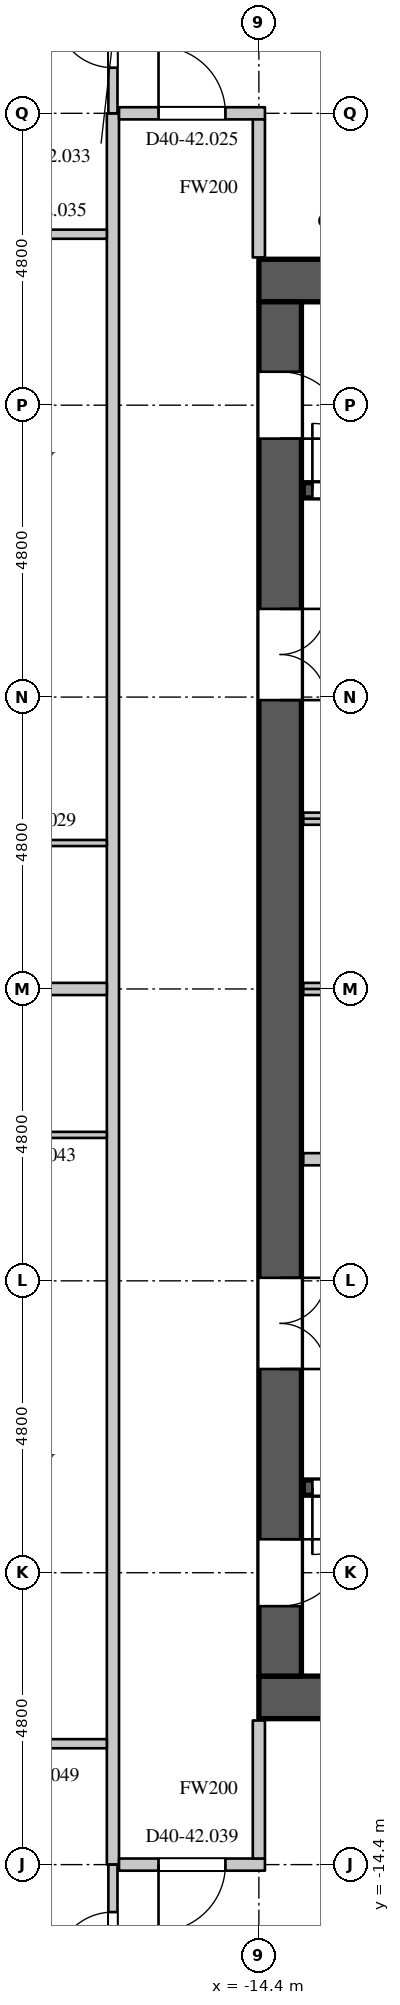
"""IFC4 building model, lengths in metres.
Left out: names, types, materials, properties, quantities, classifications, styles, units other than length and angle.
Written with IfcOpenShell. Run it as: python <this file> out.ifc"""

import sys

from ifc_helpers import new_model, si_unit, direction, frame, frame_2d, origin, place, context, subcontext, project, spatial, rectangle, extrude, element, fill, save


model = new_model("IFC4")
c1 = context("Model", 3, precision=1e-05, world=origin(), true_north=direction((0.0, 1.0)))
c2 = subcontext(c1, "Body", "Model", "MODEL_VIEW")
j1 = project(units=[si_unit("LENGTHUNIT", "METRE"), si_unit("PLANEANGLEUNIT", "RADIAN")], contexts=[c1])
p1 = place(None, origin())
s1 = spatial("IfcSite", under=j1, at=p1, CompositionType="ELEMENT")
p2 = place(p1, origin())
s2 = spatial("IfcBuilding", under=s1, at=p2, CompositionType="ELEMENT")
p3 = place(p2, frame((0.0, 0.0, 174.9)))
s3 = spatial("IfcBuildingStorey", under=s2, at=p3, CompositionType="ELEMENT", Elevation=174.9)
for number, where, z_axis, x_axis in (
    (1, (-14.4, 11.65, 0.0), (0.0, 0.0, 1.0), (1.0, 0.0, 0.0)),
    (2, (-14.4, -11.65, 0.0), (0.0, 0.0, 1.0), (1.0, 0.0, 0.0)),
):
    element("IfcWall", number, at=place(p3, frame(where, z_axis=z_axis, x_axis=x_axis)), inside=s3, PredefinedType="SHEAR", context=c2, shape_type="SweptSolid", body=[
        extrude(rectangle(XDim=28.8, YDim=0.7, at=frame_2d((14.4, 0.0))), origin(), (0.0, 0.0, 1.0), 4.2),
    ])
p4 = place(p3, frame((-14.05, -11.3, 0.0), z_axis=(0.0, 0.0, 1.0), x_axis=(0.0, 1.0, 0.0)))
e3 = element("IfcWall", 3, at=p4, inside=s3, PredefinedType="SHEAR", context=c2, shape_type="SweptSolid", body=[
    extrude(rectangle(XDim=22.6, YDim=0.7, at=frame_2d((11.3, 0.0))), origin(), (0.0, 0.0, 1.0), 4.2),
])
p5 = place(p4, frame((20.35, 0.0, 0.0)))
e4 = element("IfcOpeningElement", 4, at=p5, cuts=e3, PredefinedType="OPENING", context=c2, shape_type="SweptSolid", body=[
    extrude(rectangle(XDim=1.1, YDim=2.2, at=frame_2d((0.55, 1.1))), frame((0.0, 0.36, 0.0), z_axis=(0.0, -1.0, 0.0), x_axis=(1.0, 0.0, 0.0)), (0.0, 0.0, 1.0), 0.72),
])
p6 = place(p4, frame((1.15, 0.0, 0.0)))
e5 = element("IfcOpeningElement", 5, at=p6, cuts=e3, PredefinedType="OPENING", context=c2, shape_type="SweptSolid", body=[
    extrude(rectangle(XDim=1.1, YDim=2.2, at=frame_2d((0.55, 1.1))), frame((0.0, 0.36, 0.0), z_axis=(0.0, -1.0, 0.0), x_axis=(1.0, 0.0, 0.0)), (0.0, 0.0, 1.0), 0.72),
])
p7 = place(p4, frame((16.05, 0.0, 0.0)))
e6 = element("IfcOpeningElement", 6, at=p7, cuts=e3, PredefinedType="OPENING", context=c2, shape_type="SweptSolid", body=[
    extrude(rectangle(XDim=1.5, YDim=2.4, at=frame_2d((0.75, 1.2))), frame((0.0, 0.36, 0.0), z_axis=(0.0, -1.0, 0.0), x_axis=(1.0, 0.0, 0.0)), (0.0, 0.0, 1.0), 0.72),
])
p8 = place(p4, frame((5.05, 0.0, 0.0)))
e7 = element("IfcOpeningElement", 7, at=p8, cuts=e3, PredefinedType="OPENING", context=c2, shape_type="SweptSolid", body=[
    extrude(rectangle(XDim=1.5, YDim=2.4, at=frame_2d((0.75, 1.2))), frame((0.0, 0.36, 0.0), z_axis=(0.0, -1.0, 0.0), x_axis=(1.0, 0.0, 0.0)), (0.0, 0.0, 1.0), 0.72),
])
p9 = place(p3, frame((-16.8, -14.4, 0.0), z_axis=(0.0, 0.0, 1.0), x_axis=(0.0, 1.0, 0.0)))
e8 = element("IfcWall", 8, at=p9, inside=s3, PredefinedType="PARTITIONING", context=c2, shape_type="SweptSolid", body=[
    extrude(rectangle(XDim=28.8, YDim=0.2, at=frame_2d((14.4, 0.0))), origin(), (0.0, 0.0, 1.0), 3.95),
])
p10 = place(p3, frame((-16.7, -14.4, 0.0), z_axis=(0.0, 0.0, 1.0), x_axis=(1.0, 0.0, 0.0)))
e9 = element("IfcWall", 9, at=p10, inside=s3, PredefinedType="PARTITIONING", context=c2, shape_type="SweptSolid", body=[
    extrude(rectangle(XDim=2.4, YDim=0.2, at=frame_2d((1.2, 0.0))), origin(), (0.0, 0.0, 1.0), 3.95),
])
p11 = place(p10, frame((0.65, 0.0, 0.0)))
e10 = element("IfcOpeningElement", 10, at=p11, cuts=e9, PredefinedType="OPENING", context=c2, shape_type="SweptSolid", body=[
    extrude(rectangle(XDim=1.1, YDim=2.4, at=frame_2d((0.55, 1.2))), frame((0.0, 0.11, 0.0), z_axis=(0.0, -1.0, 0.0), x_axis=(1.0, 0.0, 0.0)), (0.0, 0.0, 1.0), 0.22),
])
p12 = place(p3, frame((-16.7, 14.4, 0.0), z_axis=(0.0, 0.0, 1.0), x_axis=(1.0, 0.0, 0.0)))
e11 = element("IfcWall", 11, at=p12, inside=s3, PredefinedType="PARTITIONING", context=c2, shape_type="SweptSolid", body=[
    extrude(rectangle(XDim=2.4, YDim=0.2, at=frame_2d((1.2, 0.0))), origin(), (0.0, 0.0, 1.0), 3.95),
])
p13 = place(p12, frame((0.65, 0.0, 0.0)))
e12 = element("IfcOpeningElement", 12, at=p13, cuts=e11, PredefinedType="OPENING", context=c2, shape_type="SweptSolid", body=[
    extrude(rectangle(XDim=1.1, YDim=2.4, at=frame_2d((0.55, 1.2))), frame((0.0, 0.11, 0.0), z_axis=(0.0, -1.0, 0.0), x_axis=(1.0, 0.0, 0.0)), (0.0, 0.0, 1.0), 0.22),
])
for number, where, z_axis, x_axis in (
    (13, (-14.4, -14.3, 0.0), (0.0, 0.0, 1.0), (0.0, 1.0, 0.0)),
    (14, (-14.4, 12.03, 0.0), (0.0, 0.0, 1.0), (0.0, 1.0, 0.0)),
):
    element("IfcWall", number, at=place(p3, frame(where, z_axis=z_axis, x_axis=x_axis)), inside=s3, PredefinedType="PARTITIONING", context=c2, shape_type="SweptSolid", body=[
        extrude(rectangle(XDim=2.27, YDim=0.2, at=frame_2d((1.135, 0.0))), origin(), (0.0, 0.0, 1.0), 3.95),
    ])
p14 = place(p3, frame((-22.538, -12.412, 0.0), z_axis=(0.0, 0.0, 1.0), x_axis=(1.0, 0.0, 0.0)))
e15 = element("IfcWall", 15, at=p14, inside=s3, PredefinedType="PARTITIONING", context=c2, shape_type="SweptSolid", body=[
    extrude(rectangle(XDim=5.638, YDim=0.15, at=frame_2d((2.819, 0.0))), origin(), (0.0, 0.0, 1.0), 3.95),
])
p15 = place(p14, frame((3.419, 0.0, 0.0)))
e16 = element("IfcOpeningElement", 16, at=p15, cuts=e15, PredefinedType="OPENING", context=c2, shape_type="SweptSolid", body=[
    extrude(rectangle(XDim=0.95, YDim=2.2, at=frame_2d((0.475, 1.1))), frame((0.0, 0.085, 0.0), z_axis=(0.0, -1.0, 0.0), x_axis=(1.0, 0.0, 0.0)), (0.0, 0.0, 1.0), 0.17),
])
p16 = place(p3, frame((-22.538, 12.412, 0.0), z_axis=(0.0, 0.0, 1.0), x_axis=(1.0, 0.0, 0.0)))
e17 = element("IfcWall", 17, at=p16, inside=s3, PredefinedType="PARTITIONING", context=c2, shape_type="SweptSolid", body=[
    extrude(rectangle(XDim=5.638, YDim=0.15, at=frame_2d((2.819, 0.0))), origin(), (0.0, 0.0, 1.0), 3.95),
])
p17 = place(p16, frame((3.419, 0.0, 0.0)))
e18 = element("IfcOpeningElement", 18, at=p17, cuts=e17, PredefinedType="OPENING", context=c2, shape_type="SweptSolid", body=[
    extrude(rectangle(XDim=0.95, YDim=2.2, at=frame_2d((0.475, 1.1))), frame((0.0, 0.085, 0.0), z_axis=(0.0, -1.0, 0.0), x_axis=(1.0, 0.0, 0.0)), (0.0, 0.0, 1.0), 0.17),
])
p18 = place(p3, frame((-16.8, -18.131, 0.0), z_axis=(0.0, 0.0, 1.0), x_axis=(0.0, 1.0, 0.0)))
e19 = element("IfcWall", 19, at=p18, inside=s3, PredefinedType="PARTITIONING", context=c2, shape_type="SweptSolid", body=[
    extrude(rectangle(XDim=3.731, YDim=0.15, at=frame_2d((1.865, 0.0))), origin(), (0.0, 0.0, 1.0), 3.95),
])
p19 = place(p18, frame((2.0, 0.0, 0.0)))
e20 = element("IfcOpeningElement", 20, at=p19, cuts=e19, PredefinedType="OPENING", context=c2, shape_type="SweptSolid", body=[
    extrude(rectangle(XDim=0.95, YDim=2.2, at=frame_2d((0.475, 1.1))), frame((0.0, 0.085, 0.0), z_axis=(0.0, -1.0, 0.0), x_axis=(1.0, 0.0, 0.0)), (0.0, 0.0, 1.0), 0.17),
])
p20 = place(p3, frame((-16.8, 14.4, 0.0), z_axis=(0.0, 0.0, 1.0), x_axis=(0.0, 1.0, 0.0)))
e21 = element("IfcWall", 21, at=p20, inside=s3, PredefinedType="PARTITIONING", context=c2, shape_type="SweptSolid", body=[
    extrude(rectangle(XDim=3.731, YDim=0.15, at=frame_2d((1.865, 0.0))), origin(), (0.0, 0.0, 1.0), 3.95),
])
p21 = place(p20, frame((0.75, 0.0, 0.0)))
e22 = element("IfcOpeningElement", 22, at=p21, cuts=e21, PredefinedType="OPENING", context=c2, shape_type="SweptSolid", body=[
    extrude(rectangle(XDim=0.95, YDim=2.2, at=frame_2d((0.475, 1.1))), frame((0.0, 0.085, 0.0), z_axis=(0.0, -1.0, 0.0), x_axis=(1.0, 0.0, 0.0)), (0.0, 0.0, 1.0), 0.17),
])
p22 = place(p3, frame((-24.055, 0.0, 0.0), z_axis=(0.0, 0.0, 1.0), x_axis=(1.0, 0.0, 0.0)))
e23 = element("IfcWall", 23, at=p22, inside=s3, PredefinedType="PARTITIONING", context=c2, shape_type="SweptSolid", body=[
    extrude(rectangle(XDim=7.155, YDim=0.2, at=frame_2d((3.578, 0.0))), origin(), (0.0, 0.0, 1.0), 3.95),
])
p23 = place(p3, frame((-13.67, -2.8, 0.0), z_axis=(0.0, 0.0, 1.0), x_axis=(1.0, 0.0, 0.0)))
e24 = element("IfcWall", 24, at=p23, inside=s3, PredefinedType="PARTITIONING", context=c2, shape_type="SweptSolid", body=[
    extrude(rectangle(XDim=3.27, YDim=0.2, at=frame_2d((1.635, 0.0))), origin(), (0.0, 0.0, 1.0), 3.95),
])
p24 = place(p23, frame((1.3, 0.0, 0.0)))
e25 = element("IfcOpeningElement", 25, at=p24, cuts=e24, PredefinedType="OPENING", context=c2, shape_type="SweptSolid", body=[
    extrude(rectangle(XDim=0.6, YDim=2.0, at=frame_2d((0.3, 1.0))), frame((0.0, 0.11, 0.0), z_axis=(0.0, -1.0, 0.0), x_axis=(1.0, 0.0, 0.0)), (0.0, 0.0, 1.0), 0.22),
])
p25 = place(p3, frame((-13.67, 0.0, 0.0), z_axis=(0.0, 0.0, 1.0), x_axis=(1.0, 0.0, 0.0)))
e26 = element("IfcWall", 26, at=p25, inside=s3, PredefinedType="PARTITIONING", context=c2, shape_type="SweptSolid", body=[
    extrude(rectangle(XDim=21.47, YDim=0.2, at=frame_2d((10.735, 0.0))), origin(), (0.0, 0.0, 1.0), 3.95),
])
p26 = place(p3, frame((-13.67, 2.8, 0.0), z_axis=(0.0, 0.0, 1.0), x_axis=(1.0, 0.0, 0.0)))
e27 = element("IfcWall", 27, at=p26, inside=s3, PredefinedType="PARTITIONING", context=c2, shape_type="SweptSolid", body=[
    extrude(rectangle(XDim=5.85, YDim=0.2, at=frame_2d((2.925, 0.0))), origin(), (0.0, 0.0, 1.0), 3.95),
])
p27 = place(p26, frame((1.05, 0.0, 0.0)))
e28 = element("IfcOpeningElement", 28, at=p27, cuts=e27, PredefinedType="OPENING", context=c2, shape_type="SweptSolid", body=[
    extrude(rectangle(XDim=1.1, YDim=2.2, at=frame_2d((0.55, 1.1))), frame((0.0, 0.11, 0.0), z_axis=(0.0, -1.0, 0.0), x_axis=(1.0, 0.0, 0.0)), (0.0, 0.0, 1.0), 0.22),
])
p28 = place(p26, frame((4.0, 0.0, 0.0)))
e29 = element("IfcOpeningElement", 29, at=p28, cuts=e27, PredefinedType="OPENING", context=c2, shape_type="SweptSolid", body=[
    extrude(rectangle(XDim=1.1, YDim=2.2, at=frame_2d((0.55, 1.1))), frame((0.0, 0.11, 0.0), z_axis=(0.0, -1.0, 0.0), x_axis=(1.0, 0.0, 0.0)), (0.0, 0.0, 1.0), 0.22),
])
p29 = place(p3, frame((-13.67, -8.2, 0.0), z_axis=(0.0, 0.0, 1.0), x_axis=(1.0, 0.0, 0.0)))
e30 = element("IfcWall", 30, at=p29, inside=s3, PredefinedType="SHEAR", context=c2, shape_type="SweptSolid", body=[
    extrude(rectangle(XDim=8.395, YDim=0.25, at=frame_2d((4.198, 0.0))), origin(), (0.0, 0.0, 1.0), 3.95),
])
p30 = place(p29, frame((0.15, 0.0, 0.0)))
e31 = element("IfcOpeningElement", 31, at=p30, cuts=e30, PredefinedType="OPENING", context=c2, shape_type="SweptSolid", body=[
    extrude(rectangle(XDim=1.1, YDim=2.2, at=frame_2d((0.55, 1.1))), frame((0.0, 0.135, 0.0), z_axis=(0.0, -1.0, 0.0), x_axis=(1.0, 0.0, 0.0)), (0.0, 0.0, 1.0), 0.27),
])
p31 = place(p3, frame((-13.67, 8.2, 0.0), z_axis=(0.0, 0.0, 1.0), x_axis=(1.0, 0.0, 0.0)))
e32 = element("IfcWall", 32, at=p31, inside=s3, PredefinedType="SHEAR", context=c2, shape_type="SweptSolid", body=[
    extrude(rectangle(XDim=8.395, YDim=0.25, at=frame_2d((4.198, 0.0))), origin(), (0.0, 0.0, 1.0), 3.95),
])
p32 = place(p31, frame((0.15, 0.0, 0.0)))
e33 = element("IfcOpeningElement", 33, at=p32, cuts=e32, PredefinedType="OPENING", context=c2, shape_type="SweptSolid", body=[
    extrude(rectangle(XDim=1.1, YDim=2.2, at=frame_2d((0.55, 1.1))), frame((0.0, 0.135, 0.0), z_axis=(0.0, -1.0, 0.0), x_axis=(1.0, 0.0, 0.0)), (0.0, 0.0, 1.0), 0.27),
])
p33 = place(p3, frame((-20.125, -2.4, 0.0), z_axis=(0.0, 0.0, 1.0), x_axis=(1.0, 0.0, 0.0)))
e34 = element("IfcWall", 34, at=p33, inside=s3, PredefinedType="PARTITIONING", context=c2, shape_type="SweptSolid", body=[
    extrude(rectangle(XDim=3.225, YDim=0.1, at=frame_2d((1.613, 0.0))), origin(), (0.0, 0.0, 1.0), 3.95),
])
p34 = place(p33, frame((1.15, 0.0, 0.0)))
e35 = element("IfcOpeningElement", 35, at=p34, cuts=e34, PredefinedType="OPENING", context=c2, shape_type="SweptSolid", body=[
    extrude(rectangle(XDim=0.9, YDim=2.2, at=frame_2d((0.45, 1.1))), frame((0.0, 0.06, 0.0), z_axis=(0.0, -1.0, 0.0), x_axis=(1.0, 0.0, 0.0)), (0.0, 0.0, 1.0), 0.12),
])
p35 = place(p3, frame((-20.125, 2.4, 0.0), z_axis=(0.0, 0.0, 1.0), x_axis=(1.0, 0.0, 0.0)))
e36 = element("IfcWall", 36, at=p35, inside=s3, PredefinedType="PARTITIONING", context=c2, shape_type="SweptSolid", body=[
    extrude(rectangle(XDim=3.225, YDim=0.1, at=frame_2d((1.613, 0.0))), origin(), (0.0, 0.0, 1.0), 3.95),
])
p36 = place(p35, frame((1.15, 0.0, 0.0)))
e37 = element("IfcOpeningElement", 37, at=p36, cuts=e36, PredefinedType="OPENING", context=c2, shape_type="SweptSolid", body=[
    extrude(rectangle(XDim=0.9, YDim=2.2, at=frame_2d((0.45, 1.1))), frame((0.0, 0.06, 0.0), z_axis=(0.0, -1.0, 0.0), x_axis=(1.0, 0.0, 0.0)), (0.0, 0.0, 1.0), 0.12),
])
p37 = place(p32, origin())
e38 = element("IfcDoor", 38, at=p37, inside=s3, OperationType="SINGLE_SWING_LEFT", PredefinedType="DOOR", context=c2, shape_type="SweptSolid", body=[
    extrude(rectangle(XDim=1.1, YDim=2.2, at=frame_2d((0.55, 1.1))), frame((0.0, 0.025, 0.0), z_axis=(0.0, -1.0, 0.0), x_axis=(1.0, 0.0, 0.0)), (0.0, 0.0, 1.0), 0.05),
])
fill(e33, e38)
p38 = place(p30, origin())
e39 = element("IfcDoor", 39, at=p38, inside=s3, OperationType="SINGLE_SWING_RIGHT", PredefinedType="DOOR", context=c2, shape_type="SweptSolid", body=[
    extrude(rectangle(XDim=1.1, YDim=2.2, at=frame_2d((0.55, 1.1))), frame((0.0, 0.025, 0.0), z_axis=(0.0, -1.0, 0.0), x_axis=(1.0, 0.0, 0.0)), (0.0, 0.0, 1.0), 0.05),
])
fill(e31, e39)
p39 = place(p5, origin())
e40 = element("IfcDoor", 40, at=p39, inside=s3, OperationType="SINGLE_SWING_RIGHT", PredefinedType="DOOR", context=c2, shape_type="SweptSolid", body=[
    extrude(rectangle(XDim=1.1, YDim=2.2, at=frame_2d((0.55, 1.1))), frame((0.0, -0.295, 0.0), z_axis=(0.0, -1.0, 0.0), x_axis=(1.0, 0.0, 0.0)), (0.0, 0.0, 1.0), 0.05),
])
fill(e4, e40)
p40 = place(p6, origin())
e41 = element("IfcDoor", 41, at=p40, inside=s3, OperationType="SINGLE_SWING_LEFT", PredefinedType="DOOR", context=c2, shape_type="SweptSolid", body=[
    extrude(rectangle(XDim=1.1, YDim=2.2, at=frame_2d((0.55, 1.1))), frame((0.0, -0.295, 0.0), z_axis=(0.0, -1.0, 0.0), x_axis=(1.0, 0.0, 0.0)), (0.0, 0.0, 1.0), 0.05),
])
fill(e5, e41)
p41 = place(p7, origin())
e42 = element("IfcDoor", 42, at=p41, inside=s3, OperationType="DOUBLE_DOOR_SINGLE_SWING", PredefinedType="DOOR", context=c2, shape_type="SweptSolid", body=[
    extrude(rectangle(XDim=1.5, YDim=2.4, at=frame_2d((0.75, 1.2))), frame((0.0, -0.295, 0.0), z_axis=(0.0, -1.0, 0.0), x_axis=(1.0, 0.0, 0.0)), (0.0, 0.0, 1.0), 0.05),
])
fill(e6, e42)
p42 = place(p8, origin())
e43 = element("IfcDoor", 43, at=p42, inside=s3, OperationType="DOUBLE_DOOR_SINGLE_SWING", PredefinedType="DOOR", context=c2, shape_type="SweptSolid", body=[
    extrude(rectangle(XDim=1.5, YDim=2.4, at=frame_2d((0.75, 1.2))), frame((0.0, -0.295, 0.0), z_axis=(0.0, -1.0, 0.0), x_axis=(1.0, 0.0, 0.0)), (0.0, 0.0, 1.0), 0.05),
])
fill(e7, e43)
p43 = place(p13, origin())
e44 = element("IfcDoor", 44, at=p43, inside=s3, OperationType="SINGLE_SWING_LEFT", PredefinedType="DOOR", context=c2, shape_type="SweptSolid", body=[
    extrude(rectangle(XDim=1.1, YDim=2.4, at=frame_2d((0.55, 1.2))), frame((0.0, 0.025, 0.0), z_axis=(0.0, -1.0, 0.0), x_axis=(1.0, 0.0, 0.0)), (0.0, 0.0, 1.0), 0.05),
])
fill(e12, e44)
p44 = place(p21, origin())
e45 = element("IfcDoor", 45, at=p44, inside=s3, OperationType="SINGLE_SWING_RIGHT", PredefinedType="DOOR", context=c2, shape_type="SweptSolid", body=[
    extrude(rectangle(XDim=0.95, YDim=2.2, at=frame_2d((0.475, 1.1))), frame((0.0, 0.025, 0.0), z_axis=(0.0, -1.0, 0.0), x_axis=(1.0, 0.0, 0.0)), (0.0, 0.0, 1.0), 0.05),
])
fill(e22, e45)
p45 = place(p11, origin())
e46 = element("IfcDoor", 46, at=p45, inside=s3, OperationType="SINGLE_SWING_RIGHT", PredefinedType="DOOR", context=c2, shape_type="SweptSolid", body=[
    extrude(rectangle(XDim=1.1, YDim=2.4, at=frame_2d((0.55, 1.2))), frame((0.0, 0.025, 0.0), z_axis=(0.0, -1.0, 0.0), x_axis=(1.0, 0.0, 0.0)), (0.0, 0.0, 1.0), 0.05),
])
fill(e10, e46)
p46 = place(p19, origin())
e47 = element("IfcDoor", 47, at=p46, inside=s3, OperationType="SINGLE_SWING_LEFT", PredefinedType="DOOR", context=c2, shape_type="SweptSolid", body=[
    extrude(rectangle(XDim=0.95, YDim=2.2, at=frame_2d((0.475, 1.1))), frame((0.0, 0.025, 0.0), z_axis=(0.0, -1.0, 0.0), x_axis=(1.0, 0.0, 0.0)), (0.0, 0.0, 1.0), 0.05),
])
fill(e20, e47)
save(model, sys.argv[1])
